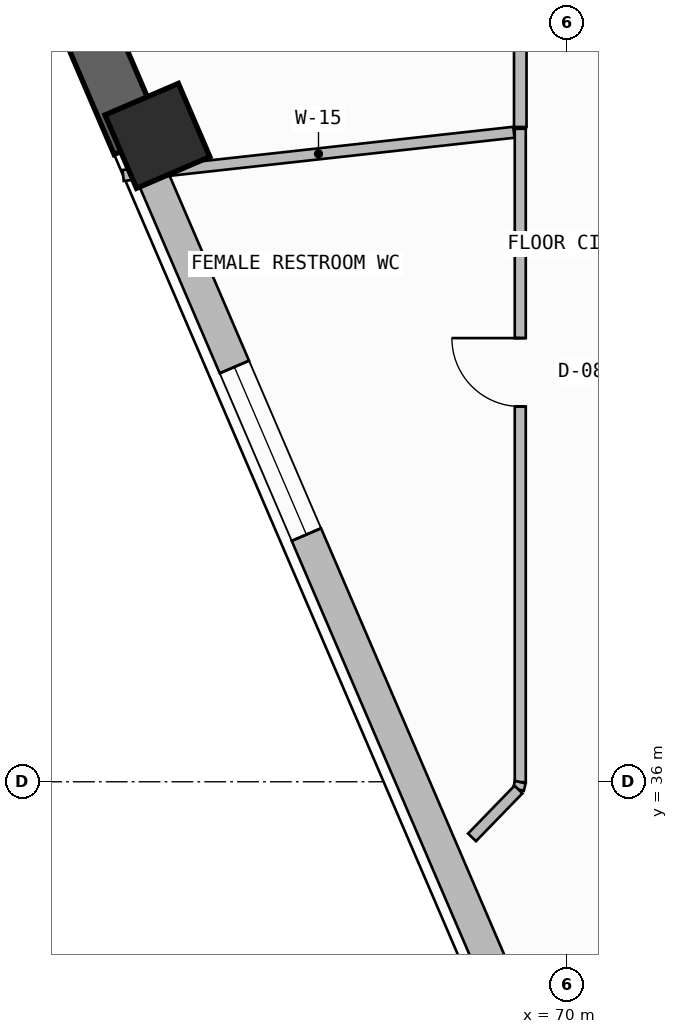
"""IFC4 building model, lengths in metres.
Left out: names, types, materials, properties, quantities, classifications, styles, units other than length and angle.
Written with IfcOpenShell. Run it as: python <this file> out.ifc"""

import sys

from ifc_helpers import new_model, si_unit, direction, frame, frame_2d, origin, origin_2d, place, context, subcontext, project, spatial, rectangle, extrude, element, fill, save


model = new_model("IFC4")
c1 = context("Model", 3, precision=1e-05, world=origin(), true_north=direction((0.0, 1.0)))
c2 = subcontext(c1, "Body", "Model", "MODEL_VIEW")
j1 = project(units=[si_unit("LENGTHUNIT", "METRE"), si_unit("PLANEANGLEUNIT", "RADIAN")], contexts=[c1])
p1 = place(None, origin())
s1 = spatial("IfcSite", under=j1, at=p1, CompositionType="ELEMENT")
p2 = place(p1, origin())
s2 = spatial("IfcBuilding", under=s1, at=p2, CompositionType="ELEMENT")
p3 = place(p2, frame((0.0, 0.0, 171.9)))
s3 = spatial("IfcBuildingStorey", under=s2, at=p3, CompositionType="ELEMENT", Elevation=171.9)
p4 = place(p3, frame((64.615, 44.498, 0.0), z_axis=(0.0, 0.0, 1.0), x_axis=(-0.394743856384, 0.918791210149, 0.0)))
e1 = element("IfcColumn", 1, at=p4, inside=s3, PredefinedType="COLUMN", context=c2, shape_type="SweptSolid", body=[
    extrude(rectangle(XDim=1.05, YDim=1.05, at=origin_2d()), origin(), (0.0, 0.0, 1.0), 3.6),
])
p5 = place(p3, frame((56.728, 62.172, -0.26), z_axis=(0.0, 0.0, 1.0), x_axis=(0.394736752992, -0.918794261974, 0.0)))
e2 = element("IfcWall", 2, at=p5, inside=s3, PredefinedType="SHEAR", context=c2, shape_type="SweptSolid", body=[
    extrude(rectangle(XDim=19.353, YDim=0.7, at=frame_2d((9.676, 0.0))), origin(), (0.0, 0.0, 1.0), 3.6),
])
p6 = place(p5, frame((7.747, 0.0, 1.2)))
e3 = element("IfcOpeningElement", 3, at=p6, cuts=e2, PredefinedType="OPENING", context=c2, shape_type="SweptSolid", body=[
    extrude(rectangle(XDim=2.4, YDim=0.9, at=frame_2d((1.2, 0.45))), frame((0.0, 0.36, 0.0), z_axis=(0.0, -1.0, 0.0), x_axis=(1.0, 0.0, 0.0)), (0.0, 0.0, 1.0), 0.72),
])
p7 = place(p3, frame((64.367, 44.391, 0.0), z_axis=(0.0, 0.0, 1.0), x_axis=(0.394757430431, -0.918785378159, 0.0)))
e4 = element("IfcWall", 4, at=p7, inside=s3, PredefinedType="SOLIDWALL", context=c2, shape_type="SweptSolid", body=[
    extrude(rectangle(XDim=12.654, YDim=0.42, at=frame_2d((6.327, 0.0))), origin(), (0.0, 0.0, 1.0), 2.725),
])
p8 = place(p7, frame((3.193, 0.0, 1.2)))
e5 = element("IfcOpeningElement", 5, at=p8, cuts=e4, PredefinedType="OPENING", context=c2, shape_type="SweptSolid", body=[
    extrude(rectangle(XDim=2.4, YDim=0.9, at=frame_2d((1.2, 0.45))), frame((0.0, 0.22, 0.0), z_axis=(0.0, -1.0, 0.0), x_axis=(1.0, 0.0, 0.0)), (0.0, 0.0, 1.0), 0.44),
])
p9 = place(p3, frame((69.04, 32.627, 0.0), z_axis=(0.0, 0.0, 1.0), x_axis=(0.91879775808, 0.394728615312, 0.0)))
e6 = element("IfcWall", 6, at=p9, inside=s3, PredefinedType="SOLIDWALL", context=c2, shape_type="SweptSolid", body=[
    extrude(rectangle(XDim=3.713, YDim=0.36, at=frame_2d((1.856, 0.0))), origin(), (0.0, 0.0, 1.0), 3.34),
])
p10 = place(p3, frame((69.389, 44.591, 0.0), z_axis=(0.0, 0.0, 1.0), x_axis=(0.0, -1.0, 0.0)))
e7 = element("IfcWall", 7, at=p10, inside=s3, PredefinedType="PARTITIONING", context=c2, shape_type="SweptSolid", body=[
    extrude(rectangle(XDim=8.595, YDim=0.145, at=frame_2d((4.298, 0.0))), origin(), (0.0, 0.0, 1.0), 3.34),
])
p11 = place(p10, frame((2.753, 0.0, 0.0)))
e8 = element("IfcOpeningElement", 8, at=p11, cuts=e7, PredefinedType="OPENING", context=c2, shape_type="SweptSolid", body=[
    extrude(rectangle(XDim=0.9, YDim=2.1, at=frame_2d((0.45, 1.05))), frame((0.0, 0.083, 0.0), z_axis=(0.0, -1.0, 0.0), x_axis=(1.0, 0.0, 0.0)), (0.0, 0.0, 1.0), 0.165),
])
p12 = place(p3, frame((69.389, 35.995, 0.0), z_axis=(0.0, 0.0, 1.0), x_axis=(-0.239657517494, -0.970857494336, 0.0)))
e9 = element("IfcWall", 9, at=p12, inside=s3, PredefinedType="PARTITIONING", context=c2, shape_type="SweptSolid", body=[
    extrude(rectangle(XDim=0.1, YDim=0.145, at=frame_2d((0.05, 0.0))), origin(), (0.0, 0.0, 1.0), 3.34),
])
p13 = place(p3, frame((64.164, 43.977, 0.0), z_axis=(0.0, 0.0, 1.0), x_axis=(0.993948043417, 0.109851203849, 0.0)))
e10 = element("IfcWall", 10, at=p13, inside=s3, PredefinedType="PARTITIONING", context=c2, shape_type="SweptSolid", body=[
    extrude(rectangle(XDim=5.172, YDim=0.145, at=frame_2d((2.586, 0.0))), origin(), (0.0, 0.0, 1.0), 3.34),
])
p14 = place(p3, frame((69.389, 51.874, 0.0), z_axis=(0.0, 0.0, 1.0), x_axis=(0.0, -1.0, 0.0)))
e11 = element("IfcWall", 11, at=p14, inside=s3, PredefinedType="PARTITIONING", context=c2, shape_type="SweptSolid", body=[
    extrude(rectangle(XDim=7.26, YDim=0.165, at=frame_2d((3.63, 0.0))), origin(), (0.0, 0.0, 1.0), 2.825),
])
p15 = place(p14, frame((3.13, 0.0, 0.0)))
e12 = element("IfcOpeningElement", 12, at=p15, cuts=e11, PredefinedType="OPENING", context=c2, shape_type="SweptSolid", body=[
    extrude(rectangle(XDim=1.0, YDim=2.2, at=frame_2d((0.5, 1.1))), frame((0.0, 0.093, 0.0), z_axis=(0.0, -1.0, 0.0), x_axis=(1.0, 0.0, 0.0)), (0.0, 0.0, 1.0), 0.185),
])
p16 = place(p3, frame((69.365, 35.898, 0.0), z_axis=(0.0, 0.0, 1.0), x_axis=(-0.696593383262, -0.717466137455, 0.0)))
e13 = element("IfcWall", 13, at=p16, inside=s3, PredefinedType="PARTITIONING", context=c2, shape_type="SweptSolid", body=[
    extrude(rectangle(XDim=0.877, YDim=0.145, at=frame_2d((0.438, 0.0))), origin(), (0.0, 0.0, 1.0), 3.34),
])
p17 = place(p8, origin())
e14 = element("IfcWindow", 14, at=p17, inside=s3, PartitioningType="SINGLE_PANEL", PredefinedType="WINDOW", context=c2, shape_type="SweptSolid", body=[
    extrude(rectangle(XDim=2.4, YDim=0.9, at=frame_2d((1.2, 0.45))), frame((0.0, 0.03, 0.0), z_axis=(0.0, -1.0, 0.0), x_axis=(1.0, 0.0, 0.0)), (0.0, 0.0, 1.0), 0.06),
])
fill(e5, e14)
p18 = place(p11, frame((0.9, 0.0, 0.0), z_axis=(0.0, 0.0, 1.0), x_axis=(-1.0, 0.0, 0.0)))
e15 = element("IfcDoor", 15, at=p18, inside=s3, OperationType="SINGLE_SWING_RIGHT", PredefinedType="DOOR", context=c2, shape_type="SweptSolid", body=[
    extrude(rectangle(XDim=0.9, YDim=2.1, at=frame_2d((0.45, 1.05))), frame((0.0, 0.025, 0.0), z_axis=(0.0, -1.0, 0.0), x_axis=(1.0, 0.0, 0.0)), (0.0, 0.0, 1.0), 0.05),
])
fill(e8, e15)
save(model, sys.argv[1])
